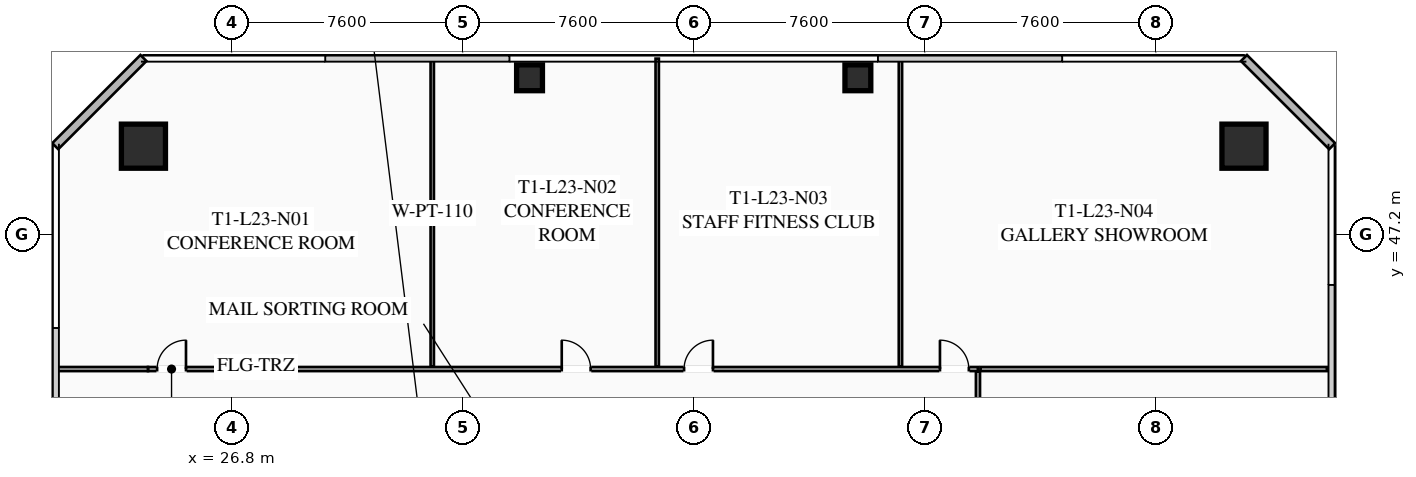
"""IFC4 building model, lengths in metres.
Left out: names, types, materials, properties, quantities, classifications, styles, units other than length and angle.
Written with IfcOpenShell. Run it as: python <this file> out.ifc"""

import sys

from ifc_helpers import new_model, si_unit, direction, frame, frame_2d, origin, origin_2d, place, context, subcontext, project, spatial, rectangle, hollow_rectangle, extrude, element, fill, save


model = new_model("IFC4")
c1 = context("Model", 3, precision=1e-05, world=origin(), true_north=direction((0.0, 1.0)))
c2 = subcontext(c1, "Body", "Model", "MODEL_VIEW")
j1 = project(units=[si_unit("LENGTHUNIT", "METRE"), si_unit("PLANEANGLEUNIT", "RADIAN")], contexts=[c1])
p1 = place(None, origin())
s1 = spatial("IfcSite", under=j1, at=p1, CompositionType="ELEMENT")
p2 = place(p1, origin())
s2 = spatial("IfcBuilding", under=s1, at=p2, CompositionType="ELEMENT")
p3 = place(p2, frame((0.0, 0.0, 88.5)))
s3 = spatial("IfcBuildingStorey", under=s2, at=p3, CompositionType="ELEMENT", Elevation=88.5)
for number, where, z_axis, x_axis in (
    (1, (60.1, 50.1, 0.0), (0.0, 0.0, 1.0), (1.0, 0.0, 0.0)),
    (2, (23.9, 50.1, 0.0), (0.0, 0.0, 1.0), (1.0, 0.0, 0.0)),
):
    element("IfcColumn", number, at=place(p3, frame(where, z_axis=z_axis, x_axis=x_axis)), inside=s3, PredefinedType="COLUMN", context=c2, shape_type="SweptSolid", body=[
        extrude(hollow_rectangle(XDim=1.45, YDim=1.45, WallThickness=0.055, at=origin_2d()), origin(), (0.0, 0.0, 1.0), 3.35),
    ])
for number, where, z_axis, x_axis in (
    (3, (47.4, 52.35, 0.0), (0.0, 0.0, 1.0), (1.0, 0.0, 0.0)),
    (4, (36.6, 52.35, 0.0), (0.0, 0.0, 1.0), (1.0, 0.0, 0.0)),
):
    element("IfcColumn", number, at=place(p3, frame(where, z_axis=z_axis, x_axis=x_axis)), inside=s3, PredefinedType="COLUMN", context=c2, shape_type="SweptSolid", body=[
        extrude(hollow_rectangle(XDim=0.85, YDim=0.85, WallThickness=0.035, at=origin_2d()), origin(), (0.0, 0.0, 1.0), 3.35),
    ])
for number, where, z_axis, x_axis in (
    (5, (21.0, 50.1, 0.0), (0.0, 0.0, 1.0), (0.707, 0.707, 0.0)),
    (6, (60.1, 53.0, 0.0), (0.0, 0.0, 1.0), (0.707, -0.707, 0.0)),
):
    element("IfcWall", number, at=place(p3, frame(where, z_axis=z_axis, x_axis=x_axis)), inside=s3, PredefinedType="SOLIDWALL", context=c2, shape_type="SweptSolid", body=[
        extrude(rectangle(XDim=4.101, YDim=0.28, at=frame_2d((2.051, 0.0))), origin(), (0.0, 0.0, 1.0), 3.35),
    ])
p4 = place(p3, frame((24.05, 42.77, 0.0), z_axis=(0.0, 0.0, 1.0), x_axis=(1.0, 0.0, 0.0)))
e7 = element("IfcWall", 7, at=p4, inside=s3, PredefinedType="PARTITIONING", context=c2, shape_type="SweptSolid", body=[
    extrude(rectangle(XDim=27.3, YDim=0.135, at=frame_2d((13.65, 0.0))), origin(), (0.0, 0.0, 1.0), 2.703),
])
p5 = place(p4, frame((0.3, 0.0, 0.0)))
e8 = element("IfcOpeningElement", 8, at=p5, cuts=e7, PredefinedType="OPENING", context=c2, shape_type="SweptSolid", body=[
    extrude(rectangle(XDim=0.95, YDim=2.05, at=frame_2d((0.475, 1.025))), frame((0.0, 0.077, 0.0), z_axis=(0.0, -1.0, 0.0), x_axis=(1.0, 0.0, 0.0)), (0.0, 0.0, 1.0), 0.155),
])
p6 = place(p4, frame((13.61, 0.0, 0.0)))
e9 = element("IfcOpeningElement", 9, at=p6, cuts=e7, PredefinedType="OPENING", context=c2, shape_type="SweptSolid", body=[
    extrude(rectangle(XDim=0.95, YDim=2.05, at=frame_2d((0.475, 1.025))), frame((0.0, 0.077, 0.0), z_axis=(0.0, -1.0, 0.0), x_axis=(1.0, 0.0, 0.0)), (0.0, 0.0, 1.0), 0.155),
])
p7 = place(p4, frame((17.633, 0.0, 0.0)))
e10 = element("IfcOpeningElement", 10, at=p7, cuts=e7, PredefinedType="OPENING", context=c2, shape_type="SweptSolid", body=[
    extrude(rectangle(XDim=0.95, YDim=2.05, at=frame_2d((0.475, 1.025))), frame((0.0, 0.077, 0.0), z_axis=(0.0, -1.0, 0.0), x_axis=(1.0, 0.0, 0.0)), (0.0, 0.0, 1.0), 0.155),
])
p8 = place(p4, frame((26.05, 0.0, 0.0)))
e11 = element("IfcOpeningElement", 11, at=p8, cuts=e7, PredefinedType="OPENING", context=c2, shape_type="SweptSolid", body=[
    extrude(rectangle(XDim=0.95, YDim=2.05, at=frame_2d((0.475, 1.025))), frame((0.0, 0.077, 0.0), z_axis=(0.0, -1.0, 0.0), x_axis=(1.0, 0.0, 0.0)), (0.0, 0.0, 1.0), 0.155),
])
p9 = place(p3, frame((21.02, 42.77, 0.0), z_axis=(0.0, 0.0, 1.0), x_axis=(1.0, 0.0, 0.0)))
e12 = element("IfcWall", 12, at=p9, inside=s3, PredefinedType="PARTITIONING", context=c2, shape_type="SweptSolid", body=[
    extrude(rectangle(XDim=3.03, YDim=0.135, at=frame_2d((1.515, 0.0))), origin(), (0.0, 0.0, 1.0), 2.703),
])
for number, where, z_axis, x_axis in (
    (13, (33.4, 42.85, 0.0), (0.0, 0.0, 1.0), (0.0, 1.0, 0.0)),
    (14, (40.8, 42.85, 0.0), (0.0, 0.0, 1.0), (0.0, 1.0, 0.0)),
    (15, (48.8, 42.85, 0.0), (0.0, 0.0, 1.0), (0.0, 1.0, 0.0)),
):
    element("IfcWall", number, at=place(p3, frame(where, z_axis=z_axis, x_axis=x_axis)), inside=s3, PredefinedType="PARTITIONING", context=c2, shape_type="SweptSolid", body=[
        extrude(rectangle(XDim=10.13, YDim=0.11, at=frame_2d((5.065, 0.0))), origin(), (0.0, 0.0, 1.0), 2.703),
    ])
p10 = place(p3, frame((51.35, 42.69, 0.0), z_axis=(0.0, 0.0, 1.0), x_axis=(0.0, -1.0, 0.0)))
e16 = element("IfcWall", 16, at=p10, inside=s3, PredefinedType="PARTITIONING", context=c2, shape_type="SweptSolid", body=[
    extrude(rectangle(XDim=21.66, YDim=0.135, at=frame_2d((10.83, 0.0))), origin(), (0.0, 0.0, 1.0), 2.703),
])
p11 = place(p10, frame((20.41, 0.0, 0.0)))
e17 = element("IfcOpeningElement", 17, at=p11, cuts=e16, PredefinedType="OPENING", context=c2, shape_type="SweptSolid", body=[
    extrude(rectangle(XDim=0.95, YDim=2.05, at=frame_2d((0.475, 1.025))), frame((0.0, 0.077, 0.0), z_axis=(0.0, -1.0, 0.0), x_axis=(1.0, 0.0, 0.0)), (0.0, 0.0, 1.0), 0.155),
])
p12 = place(p3, frame((62.83, 42.77, 0.0), z_axis=(0.0, 0.0, 1.0), x_axis=(-1.0, 0.0, 0.0)))
e18 = element("IfcWall", 18, at=p12, inside=s3, PredefinedType="PARTITIONING", context=c2, shape_type="SweptSolid", body=[
    extrude(rectangle(XDim=11.4, YDim=0.135, at=frame_2d((5.7, 0.0))), origin(), (0.0, 0.0, 1.0), 2.703),
])
p13 = place(p5, origin())
e19 = element("IfcDoor", 19, at=p13, inside=s3, OperationType="SINGLE_SWING_RIGHT", PredefinedType="DOOR", context=c2, shape_type="SweptSolid", body=[
    extrude(rectangle(XDim=0.95, YDim=2.05, at=frame_2d((0.475, 1.025))), frame((0.0, 0.025, 0.0), z_axis=(0.0, -1.0, 0.0), x_axis=(1.0, 0.0, 0.0)), (0.0, 0.0, 1.0), 0.05),
])
fill(e8, e19)
p14 = place(p6, origin())
e20 = element("IfcDoor", 20, at=p14, inside=s3, OperationType="SINGLE_SWING_LEFT", PredefinedType="DOOR", context=c2, shape_type="SweptSolid", body=[
    extrude(rectangle(XDim=0.95, YDim=2.05, at=frame_2d((0.475, 1.025))), frame((0.0, 0.025, 0.0), z_axis=(0.0, -1.0, 0.0), x_axis=(1.0, 0.0, 0.0)), (0.0, 0.0, 1.0), 0.05),
])
fill(e9, e20)
p15 = place(p7, origin())
e21 = element("IfcDoor", 21, at=p15, inside=s3, OperationType="SINGLE_SWING_RIGHT", PredefinedType="DOOR", context=c2, shape_type="SweptSolid", body=[
    extrude(rectangle(XDim=0.95, YDim=2.05, at=frame_2d((0.475, 1.025))), frame((0.0, 0.025, 0.0), z_axis=(0.0, -1.0, 0.0), x_axis=(1.0, 0.0, 0.0)), (0.0, 0.0, 1.0), 0.05),
])
fill(e10, e21)
p16 = place(p8, origin())
e22 = element("IfcDoor", 22, at=p16, inside=s3, OperationType="SINGLE_SWING_LEFT", PredefinedType="DOOR", context=c2, shape_type="SweptSolid", body=[
    extrude(rectangle(XDim=0.95, YDim=2.05, at=frame_2d((0.475, 1.025))), frame((0.0, 0.025, 0.0), z_axis=(0.0, -1.0, 0.0), x_axis=(1.0, 0.0, 0.0)), (0.0, 0.0, 1.0), 0.05),
])
fill(e11, e22)
save(model, sys.argv[1])
